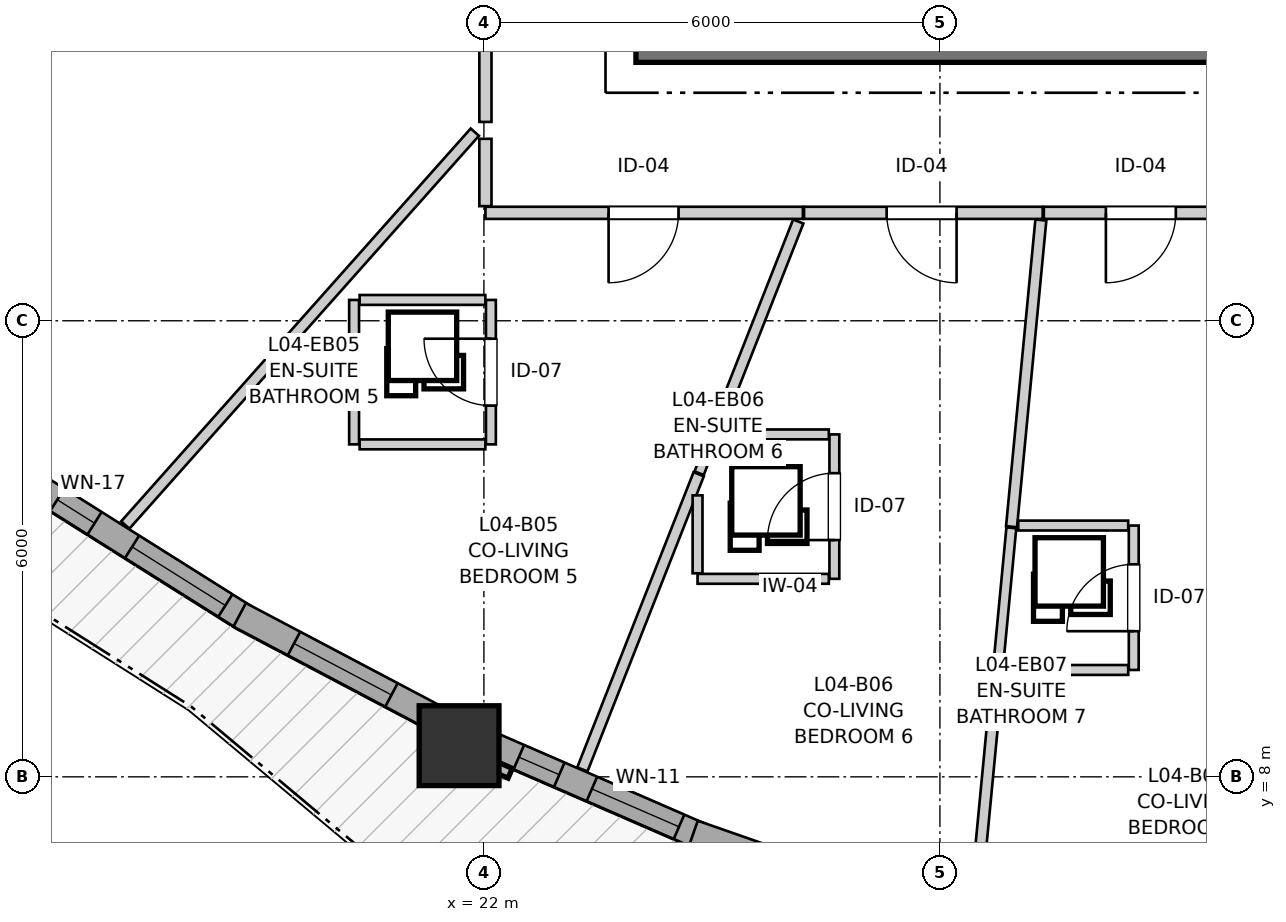
"""IFC4 building model, lengths in metres.
Left out: names, types, materials, properties, quantities, classifications, styles, units other than length and angle.
Written with IfcOpenShell. Run it as: python <this file> out.ifc"""

import sys

from ifc_helpers import new_model, si_unit, direction, frame, frame_2d, origin, origin_2d, place, context, subcontext, project, spatial, rectangle, extrude, source, transform, mapped, element, fill, save


model = new_model("IFC4")
c1 = context("Model", 3, precision=1e-05, world=origin(), true_north=direction((0.0, 1.0)))
c2 = subcontext(c1, "Body", "Model", "MODEL_VIEW")
j1 = project(units=[si_unit("LENGTHUNIT", "METRE"), si_unit("PLANEANGLEUNIT", "RADIAN")], contexts=[c1])
p1 = place(None, origin())
s1 = spatial("IfcSite", under=j1, at=p1, CompositionType="ELEMENT")
p2 = place(p1, origin())
s2 = spatial("IfcBuilding", under=s1, at=p2, CompositionType="ELEMENT")
p3 = place(p2, frame((0.0, 0.0, 17.4)))
s3 = spatial("IfcBuildingStorey", under=s2, at=p3, CompositionType="ELEMENT", Elevation=17.4)
p4 = place(p3, frame((24.0, 17.8, 0.0), z_axis=(0.0, 0.0, 1.0), x_axis=(1.0, 0.0, 0.0)))
e1 = element("IfcWall", 1, at=p4, inside=s3, PredefinedType="SHEAR", context=c2, shape_type="SweptSolid", body=[
    extrude(rectangle(XDim=12.7, YDim=0.8, at=frame_2d((6.35, 0.0))), origin(), (0.0, 0.0, 1.0), 2.94),
])
m1 = source(origin(), c2, "Body", "SweptSolid", [
    extrude(rectangle(XDim=1.05, YDim=1.05, at=origin_2d()), origin(), (0.0, 0.0, 1.0), 2.94),
])
p5 = place(p3, frame((21.673, 8.41, 0.0), z_axis=(0.0, 0.0, 1.0), x_axis=(1.0, 0.0, 0.0)))
e2 = element("IfcColumn", 2, at=p5, inside=s3, PredefinedType="COLUMN", context=c2, shape_type="MappedRepresentation", body=[
    mapped(m1, transform((0.0, 0.0, 0.0), x_axis=(1.0, 0.0, 0.0), y_axis=(0.0, 1.0, 0.0), z_axis=(0.0, 0.0, 1.0), scale=1.0)),
])
p6 = place(p3, frame((16.04, 11.864, 0.0), z_axis=(0.0, 0.0, 1.0), x_axis=(0.846428302834, -0.532502702492, 0.0)))
e3 = element("IfcWall", 3, at=p6, inside=s3, PredefinedType="SOLIDWALL", context=c2, shape_type="SweptSolid", body=[
    extrude(rectangle(XDim=3.336, YDim=0.35, at=frame_2d((1.668, 0.0))), origin(), (0.0, 0.0, 1.0), 2.42),
])
p7 = place(p6, frame((0.409, 0.0, 0.82)))
e4 = element("IfcOpeningElement", 4, at=p7, cuts=e3, PredefinedType="OPENING", context=c2, shape_type="SweptSolid", body=[
    extrude(rectangle(XDim=0.58, YDim=1.35, at=frame_2d((0.29, 0.675))), frame((0.0, 0.185, 0.0), z_axis=(0.0, -1.0, 0.0), x_axis=(1.0, 0.0, 0.0)), (0.0, 0.0, 1.0), 0.37),
])
p8 = place(p6, frame((1.573, 0.0, 0.82)))
e5 = element("IfcOpeningElement", 5, at=p8, cuts=e3, PredefinedType="OPENING", context=c2, shape_type="SweptSolid", body=[
    extrude(rectangle(XDim=1.45, YDim=1.25, at=frame_2d((0.725, 0.625))), frame((0.0, 0.185, 0.0), z_axis=(0.0, -1.0, 0.0), x_axis=(1.0, 0.0, 0.0)), (0.0, 0.0, 1.0), 0.37),
])
p9 = place(p3, frame((18.787, 10.131, 0.0), z_axis=(0.0, 0.0, 1.0), x_axis=(0.88440307047, -0.466723910834, 0.0)))
e6 = element("IfcWall", 6, at=p9, inside=s3, PredefinedType="SOLIDWALL", context=c2, shape_type="SweptSolid", body=[
    extrude(rectangle(XDim=3.056, YDim=0.35, at=frame_2d((1.528, 0.0))), origin(), (0.0, 0.0, 1.0), 2.42),
])
p10 = place(p9, frame((0.808, 0.0, 0.82)))
e7 = element("IfcOpeningElement", 7, at=p10, cuts=e6, PredefinedType="OPENING", context=c2, shape_type="SweptSolid", body=[
    extrude(rectangle(XDim=1.45, YDim=1.25, at=frame_2d((0.725, 0.625))), frame((0.0, 0.185, 0.0), z_axis=(0.0, -1.0, 0.0), x_axis=(1.0, 0.0, 0.0)), (0.0, 0.0, 1.0), 0.37),
])
p11 = place(p3, frame((22.018, 8.451, 0.0), z_axis=(0.0, 0.0, 1.0), x_axis=(0.917071318244, -0.398723208824, 0.0)))
e8 = element("IfcWall", 8, at=p11, inside=s3, PredefinedType="SOLIDWALL", context=c2, shape_type="SweptSolid", body=[
    extrude(rectangle(XDim=3.076, YDim=0.35, at=frame_2d((1.538, 0.0))), origin(), (0.0, 0.0, 1.0), 2.42),
])
p12 = place(p11, frame((0.481, 0.0, 0.82)))
e9 = element("IfcOpeningElement", 9, at=p12, cuts=e8, PredefinedType="OPENING", context=c2, shape_type="SweptSolid", body=[
    extrude(rectangle(XDim=0.58, YDim=1.35, at=frame_2d((0.29, 0.675))), frame((0.0, 0.185, 0.0), z_axis=(0.0, -1.0, 0.0), x_axis=(1.0, 0.0, 0.0)), (0.0, 0.0, 1.0), 0.37),
])
p13 = place(p11, frame((1.529, 0.0, 0.82)))
e10 = element("IfcOpeningElement", 10, at=p13, cuts=e8, PredefinedType="OPENING", context=c2, shape_type="SweptSolid", body=[
    extrude(rectangle(XDim=1.25, YDim=1.35, at=frame_2d((0.625, 0.675))), frame((0.0, 0.185, 0.0), z_axis=(0.0, -1.0, 0.0), x_axis=(1.0, 0.0, 0.0)), (0.0, 0.0, 1.0), 0.37),
])
p14 = place(p3, frame((24.756, 7.257, 0.0), z_axis=(0.0, 0.0, 1.0), x_axis=(0.944142925437, -0.329536244361, 0.0)))
e11 = element("IfcWall", 11, at=p14, inside=s3, PredefinedType="SOLIDWALL", context=c2, shape_type="SweptSolid", body=[
    extrude(rectangle(XDim=3.393, YDim=0.35, at=frame_2d((1.697, 0.0))), origin(), (0.0, 0.0, 1.0), 2.42),
])
p15 = place(p14, frame((0.982, 0.0, 0.82)))
e12 = element("IfcOpeningElement", 12, at=p15, cuts=e11, PredefinedType="OPENING", context=c2, shape_type="SweptSolid", body=[
    extrude(rectangle(XDim=1.45, YDim=1.25, at=frame_2d((0.725, 0.625))), frame((0.0, 0.185, 0.0), z_axis=(0.0, -1.0, 0.0), x_axis=(1.0, 0.0, 0.0)), (0.0, 0.0, 1.0), 0.37),
])
p16 = place(p3, frame((22.02, 16.616, 0.0), z_axis=(0.0, 0.0, 1.0), x_axis=(0.0, 1.0, 0.0)))
e13 = element("IfcWall", 13, at=p16, inside=s3, PredefinedType="PARTITIONING", context=c2, shape_type="SweptSolid", body=[
    extrude(rectangle(XDim=7.534, YDim=0.16, at=frame_2d((3.767, 0.0))), origin(), (0.0, 0.0, 1.0), 2.94),
])
p17 = place(p16, frame((2.98, 0.0, 0.0)))
e14 = element("IfcOpeningElement", 14, at=p17, cuts=e13, PredefinedType="OPENING", context=c2, shape_type="SweptSolid", body=[
    extrude(rectangle(XDim=1.3, YDim=2.1, at=frame_2d((0.65, 1.05))), frame((0.0, 0.09, 0.0), z_axis=(0.0, -1.0, 0.0), x_axis=(1.0, 0.0, 0.0)), (0.0, 0.0, 1.0), 0.18),
])
p18 = place(p3, frame((26.197, 15.42, 0.0), z_axis=(0.0, 0.0, 1.0), x_axis=(-1.0, 0.0, 0.0)))
e15 = element("IfcWall", 15, at=p18, inside=s3, PredefinedType="PARTITIONING", context=c2, shape_type="SweptSolid", body=[
    extrude(rectangle(XDim=4.177, YDim=0.16, at=frame_2d((2.088, 0.0))), origin(), (0.0, 0.0, 1.0), 2.94),
])
p19 = place(p18, frame((1.636, 0.0, 0.0)))
e16 = element("IfcOpeningElement", 16, at=p19, cuts=e15, PredefinedType="OPENING", context=c2, shape_type="SweptSolid", body=[
    extrude(rectangle(XDim=0.92, YDim=2.1, at=frame_2d((0.46, 1.05))), frame((0.0, 0.09, 0.0), z_axis=(0.0, -1.0, 0.0), x_axis=(1.0, 0.0, 0.0)), (0.0, 0.0, 1.0), 0.18),
])
p20 = place(p3, frame((29.352, 15.42, 0.0), z_axis=(0.0, 0.0, 1.0), x_axis=(-1.0, 0.0, 0.0)))
e17 = element("IfcWall", 17, at=p20, inside=s3, PredefinedType="PARTITIONING", context=c2, shape_type="SweptSolid", body=[
    extrude(rectangle(XDim=3.14, YDim=0.16, at=frame_2d((1.57, 0.0))), origin(), (0.0, 0.0, 1.0), 2.94),
])
p21 = place(p20, frame((1.133, 0.0, 0.0)))
e18 = element("IfcOpeningElement", 18, at=p21, cuts=e17, PredefinedType="OPENING", context=c2, shape_type="SweptSolid", body=[
    extrude(rectangle(XDim=0.92, YDim=2.1, at=frame_2d((0.46, 1.05))), frame((0.0, 0.09, 0.0), z_axis=(0.0, -1.0, 0.0), x_axis=(1.0, 0.0, 0.0)), (0.0, 0.0, 1.0), 0.18),
])
p22 = place(p3, frame((31.965, 15.42, 0.0), z_axis=(0.0, 0.0, 1.0), x_axis=(-1.0, 0.0, 0.0)))
e19 = element("IfcWall", 19, at=p22, inside=s3, PredefinedType="PARTITIONING", context=c2, shape_type="SweptSolid", body=[
    extrude(rectangle(XDim=2.598, YDim=0.16, at=frame_2d((1.299, 0.0))), origin(), (0.0, 0.0, 1.0), 2.94),
])
p23 = place(p22, frame((0.862, 0.0, 0.0)))
e20 = element("IfcOpeningElement", 20, at=p23, cuts=e19, PredefinedType="OPENING", context=c2, shape_type="SweptSolid", body=[
    extrude(rectangle(XDim=0.92, YDim=2.1, at=frame_2d((0.46, 1.05))), frame((0.0, 0.09, 0.0), z_axis=(0.0, -1.0, 0.0), x_axis=(1.0, 0.0, 0.0)), (0.0, 0.0, 1.0), 0.18),
])
p24 = place(p3, frame((26.611, 10.605, 0.0), z_axis=(0.0, 0.0, 1.0), x_axis=(0.0, 1.0, 0.0)))
e21 = element("IfcWall", 21, at=p24, inside=s3, PredefinedType="PARTITIONING", context=c2, shape_type="SweptSolid", body=[
    extrude(rectangle(XDim=1.9, YDim=0.13, at=frame_2d((0.95, 0.0))), origin(), (0.0, 0.0, 1.0), 2.94),
])
p25 = place(p24, frame((0.51, 0.0, 0.0)))
e22 = element("IfcOpeningElement", 22, at=p25, cuts=e21, PredefinedType="OPENING", context=c2, shape_type="SweptSolid", body=[
    extrude(rectangle(XDim=0.88, YDim=2.05, at=frame_2d((0.44, 1.025))), frame((0.0, 0.075, 0.0), z_axis=(0.0, -1.0, 0.0), x_axis=(1.0, 0.0, 0.0)), (0.0, 0.0, 1.0), 0.15),
])
p26 = place(p3, frame((22.092, 12.374, 0.0), z_axis=(0.0, 0.0, 1.0), x_axis=(0.0, 1.0, 0.0)))
e23 = element("IfcWall", 23, at=p26, inside=s3, PredefinedType="PARTITIONING", context=c2, shape_type="SweptSolid", body=[
    extrude(rectangle(XDim=1.9, YDim=0.13, at=frame_2d((0.95, 0.0))), origin(), (0.0, 0.0, 1.0), 2.94),
])
p27 = place(p26, frame((0.51, 0.0, 0.0)))
e24 = element("IfcOpeningElement", 24, at=p27, cuts=e23, PredefinedType="OPENING", context=c2, shape_type="SweptSolid", body=[
    extrude(rectangle(XDim=0.88, YDim=2.05, at=frame_2d((0.44, 1.025))), frame((0.0, 0.075, 0.0), z_axis=(0.0, -1.0, 0.0), x_axis=(1.0, 0.0, 0.0)), (0.0, 0.0, 1.0), 0.15),
])
p28 = place(p3, frame((30.55, 9.406, 0.0), z_axis=(0.0, 0.0, 1.0), x_axis=(0.0, 1.0, 0.0)))
e25 = element("IfcWall", 25, at=p28, inside=s3, PredefinedType="PARTITIONING", context=c2, shape_type="SweptSolid", body=[
    extrude(rectangle(XDim=1.9, YDim=0.13, at=frame_2d((0.95, 0.0))), origin(), (0.0, 0.0, 1.0), 2.94),
])
p29 = place(p28, frame((0.51, 0.0, 0.0)))
e26 = element("IfcOpeningElement", 26, at=p29, cuts=e25, PredefinedType="OPENING", context=c2, shape_type="SweptSolid", body=[
    extrude(rectangle(XDim=0.88, YDim=2.05, at=frame_2d((0.44, 1.025))), frame((0.0, 0.075, 0.0), z_axis=(0.0, -1.0, 0.0), x_axis=(1.0, 0.0, 0.0)), (0.0, 0.0, 1.0), 0.15),
])
p30 = place(p3, frame((17.281, 11.313, 0.0), z_axis=(0.0, 0.0, 1.0), x_axis=(0.664782074701, 0.747037343883, 0.0)))
e27 = element("IfcWall", 27, at=p30, inside=s3, PredefinedType="PARTITIONING", context=c2, shape_type="SweptSolid", body=[
    extrude(rectangle(XDim=6.919, YDim=0.145, at=frame_2d((3.459, 0.0))), origin(), (0.0, 0.0, 1.0), 2.94),
])
p31 = place(p3, frame((23.295, 8.098, 0.0), z_axis=(0.0, 0.0, 1.0), x_axis=(0.366696366135, 0.930340676883, 0.0)))
e28 = element("IfcWall", 28, at=p31, inside=s3, PredefinedType="PARTITIONING", context=c2, shape_type="SweptSolid", body=[
    extrude(rectangle(XDim=4.174, YDim=0.145, at=frame_2d((2.087, 0.0))), origin(), (0.0, 0.0, 1.0), 2.94),
])
p32 = place(p3, frame((28.942, 11.291, 0.0), z_axis=(0.0, 0.0, 1.0), x_axis=(0.095244050973, 0.995453952101, 0.0)))
e29 = element("IfcWall", 29, at=p32, inside=s3, PredefinedType="PARTITIONING", context=c2, shape_type="SweptSolid", body=[
    extrude(rectangle(XDim=4.052, YDim=0.145, at=frame_2d((2.026, 0.0))), origin(), (0.0, 0.0, 1.0), 2.94),
])
p33 = place(p3, frame((28.455, 6.206, 0.0), z_axis=(0.0, 0.0, 1.0), x_axis=(0.095101625286, 0.995467568968, 0.0)))
e30 = element("IfcWall", 30, at=p33, inside=s3, PredefinedType="PARTITIONING", context=c2, shape_type="SweptSolid", body=[
    extrude(rectangle(XDim=3.229, YDim=0.145, at=frame_2d((1.615, 0.0))), origin(), (0.0, 0.0, 1.0), 2.94),
])
p34 = place(p3, frame((25.026, 12.49, 0.0), z_axis=(0.0, 0.0, 1.0), x_axis=(0.366755134598, 0.930317510985, 0.0)))
e31 = element("IfcWall", 31, at=p34, inside=s3, PredefinedType="PARTITIONING", context=c2, shape_type="SweptSolid", body=[
    extrude(rectangle(XDim=3.027, YDim=0.145, at=frame_2d((1.513, 0.0))), origin(), (0.0, 0.0, 1.0), 2.94),
])
p35 = place(p3, frame((20.292, 12.374, 0.0), z_axis=(0.0, 0.0, 1.0), x_axis=(0.0, 1.0, 0.0)))
e32 = element("IfcWall", 32, at=p35, inside=s3, PredefinedType="PARTITIONING", context=c2, shape_type="SweptSolid", body=[
    extrude(rectangle(XDim=1.9, YDim=0.13, at=frame_2d((0.95, 0.0))), origin(), (0.0, 0.0, 1.0), 2.94),
])
p36 = place(p3, frame((28.764, 9.436, 0.0), z_axis=(0.0, 0.0, 1.0), x_axis=(0.094821557036, 0.995494285429, 0.0)))
e33 = element("IfcWall", 33, at=p36, inside=s3, PredefinedType="PARTITIONING", context=c2, shape_type="SweptSolid", body=[
    extrude(rectangle(XDim=1.849, YDim=0.13, at=frame_2d((0.924, 0.0))), origin(), (0.0, 0.0, 1.0), 2.94),
])
p37 = place(p3, frame((24.811, 10.605, 0.0), z_axis=(0.0, 0.0, 1.0), x_axis=(1.0, 0.0, 0.0)))
e34 = element("IfcWall", 34, at=p37, inside=s3, PredefinedType="PARTITIONING", context=c2, shape_type="SweptSolid", body=[
    extrude(rectangle(XDim=1.727, YDim=0.13, at=frame_2d((0.864, 0.0))), origin(), (0.0, 0.0, 1.0), 2.508),
])
for number, where, z_axis, x_axis in (
    (35, (20.365, 14.274, 0.0), (0.0, 0.0, 1.0), (1.0, 0.0, 0.0)),
    (36, (20.365, 12.374, 0.0), (0.0, 0.0, 1.0), (1.0, 0.0, 0.0)),
):
    element("IfcWall", number, at=place(p3, frame(where, z_axis=z_axis, x_axis=x_axis)), inside=s3, PredefinedType="PARTITIONING", context=c2, shape_type="SweptSolid", body=[
        extrude(rectangle(XDim=1.654, YDim=0.13, at=frame_2d((0.827, 0.0))), origin(), (0.0, 0.0, 1.0), 2.94),
    ])
p38 = place(p3, frame((28.848, 9.406, 0.0), z_axis=(0.0, 0.0, 1.0), x_axis=(1.0, 0.0, 0.0)))
e37 = element("IfcWall", 37, at=p38, inside=s3, PredefinedType="PARTITIONING", context=c2, shape_type="SweptSolid", body=[
    extrude(rectangle(XDim=1.629, YDim=0.13, at=frame_2d((0.814, 0.0))), origin(), (0.0, 0.0, 1.0), 2.508),
])
p39 = place(p3, frame((29.03, 11.306, 0.0), z_axis=(0.0, 0.0, 1.0), x_axis=(1.0, 0.0, 0.0)))
e38 = element("IfcWall", 38, at=p39, inside=s3, PredefinedType="PARTITIONING", context=c2, shape_type="SweptSolid", body=[
    extrude(rectangle(XDim=1.447, YDim=0.13, at=frame_2d((0.724, 0.0))), origin(), (0.0, 0.0, 1.0), 2.94),
])
p40 = place(p3, frame((25.144, 12.505, 0.0), z_axis=(0.0, 0.0, 1.0), x_axis=(1.0, 0.0, 0.0)))
e39 = element("IfcWall", 39, at=p40, inside=s3, PredefinedType="PARTITIONING", context=c2, shape_type="SweptSolid", body=[
    extrude(rectangle(XDim=1.395, YDim=0.13, at=frame_2d((0.697, 0.0))), origin(), (0.0, 0.0, 1.0), 2.94),
])
p41 = place(p3, frame((24.811, 10.678, 0.0), z_axis=(0.0, 0.0, 1.0), x_axis=(0.0, 1.0, 0.0)))
e40 = element("IfcWall", 40, at=p41, inside=s3, PredefinedType="PARTITIONING", context=c2, shape_type="SweptSolid", body=[
    extrude(rectangle(XDim=1.025, YDim=0.13, at=frame_2d((0.512, 0.0))), origin(), (0.0, 0.0, 1.0), 2.94),
])
p42 = place(p3, frame((22.02, 15.508, 0.0), z_axis=(0.0, 0.0, 1.0), x_axis=(0.0, 1.0, 0.0)))
e41 = element("IfcWall", 41, at=p42, inside=s3, PredefinedType="PARTITIONING", context=c2, shape_type="SweptSolid", body=[
    extrude(rectangle(XDim=0.886, YDim=0.16, at=frame_2d((0.443, 0.0))), origin(), (0.0, 0.0, 1.0), 2.94),
])
p43 = place(p3, frame((24.831, 11.995, 0.0), z_axis=(0.0, 0.0, 1.0), x_axis=(0.366499739739, 0.93041815372, 0.0)))
e42 = element("IfcWall", 42, at=p43, inside=s3, PredefinedType="PARTITIONING", context=c2, shape_type="SweptSolid", body=[
    extrude(rectangle(XDim=0.517, YDim=0.13, at=frame_2d((0.258, 0.0))), origin(), (0.0, 0.0, 1.0), 2.94),
])
m2 = source(origin(), c2, "Body", "SweptSolid", [
    extrude(rectangle(XDim=0.58, YDim=1.35, at=frame_2d((0.29, 0.675))), frame((0.0, 0.03, 0.0), z_axis=(0.0, -1.0, 0.0), x_axis=(1.0, 0.0, 0.0)), (0.0, 0.0, 1.0), 0.06),
])
p44 = place(p7, origin())
e43 = element("IfcWindow", 43, at=p44, inside=s3, PartitioningType="SINGLE_PANEL", PredefinedType="WINDOW", context=c2, shape_type="MappedRepresentation", body=[
    mapped(m2, transform((0.0, 0.0, 0.0), x_axis=(1.0, 0.0, 0.0), y_axis=(0.0, 1.0, 0.0), z_axis=(0.0, 0.0, 1.0), scale=1.0)),
])
fill(e4, e43)
m3 = source(origin(), c2, "Body", "SweptSolid", [
    extrude(rectangle(XDim=1.45, YDim=1.25, at=frame_2d((0.725, 0.625))), frame((0.0, 0.03, 0.0), z_axis=(0.0, -1.0, 0.0), x_axis=(1.0, 0.0, 0.0)), (0.0, 0.0, 1.0), 0.06),
])
p45 = place(p8, origin())
e44 = element("IfcWindow", 44, at=p45, inside=s3, PartitioningType="SINGLE_PANEL", PredefinedType="WINDOW", context=c2, shape_type="MappedRepresentation", body=[
    mapped(m3, transform((0.0, 0.0, 0.0), x_axis=(1.0, 0.0, 0.0), y_axis=(0.0, 1.0, 0.0), z_axis=(0.0, 0.0, 1.0), scale=1.0)),
])
fill(e5, e44)
p46 = place(p10, origin())
e45 = element("IfcWindow", 45, at=p46, inside=s3, PartitioningType="SINGLE_PANEL", PredefinedType="WINDOW", context=c2, shape_type="MappedRepresentation", body=[
    mapped(m3, transform((0.0, 0.0, 0.0), x_axis=(1.0, 0.0, 0.0), y_axis=(0.0, 1.0, 0.0), z_axis=(0.0, 0.0, 1.0), scale=1.0)),
])
fill(e7, e45)
p47 = place(p12, origin())
e46 = element("IfcWindow", 46, at=p47, inside=s3, PartitioningType="SINGLE_PANEL", PredefinedType="WINDOW", context=c2, shape_type="MappedRepresentation", body=[
    mapped(m2, transform((0.0, 0.0, 0.0), x_axis=(1.0, 0.0, 0.0), y_axis=(0.0, 1.0, 0.0), z_axis=(0.0, 0.0, 1.0), scale=1.0)),
])
fill(e9, e46)
m4 = source(origin(), c2, "Body", "SweptSolid", [
    extrude(rectangle(XDim=1.25, YDim=1.35, at=frame_2d((0.625, 0.675))), frame((0.0, 0.03, 0.0), z_axis=(0.0, -1.0, 0.0), x_axis=(1.0, 0.0, 0.0)), (0.0, 0.0, 1.0), 0.06),
])
p48 = place(p13, origin())
e47 = element("IfcWindow", 47, at=p48, inside=s3, PartitioningType="SINGLE_PANEL", PredefinedType="WINDOW", context=c2, shape_type="MappedRepresentation", body=[
    mapped(m4, transform((0.0, 0.0, 0.0), x_axis=(1.0, 0.0, 0.0), y_axis=(0.0, 1.0, 0.0), z_axis=(0.0, 0.0, 1.0), scale=1.0)),
])
fill(e10, e47)
m5 = source(origin(), c2, "Body", "SweptSolid", [
    extrude(rectangle(XDim=0.92, YDim=2.1, at=frame_2d((0.46, 1.05))), frame((0.0, 0.025, 0.0), z_axis=(0.0, -1.0, 0.0), x_axis=(1.0, 0.0, 0.0)), (0.0, 0.0, 1.0), 0.05),
])
p49 = place(p19, origin())
e48 = element("IfcDoor", 48, at=p49, inside=s3, OperationType="SINGLE_SWING_RIGHT", PredefinedType="DOOR", context=c2, shape_type="MappedRepresentation", body=[
    mapped(m5, transform((0.0, 0.0, 0.0), x_axis=(1.0, 0.0, 0.0), y_axis=(0.0, 1.0, 0.0), z_axis=(0.0, 0.0, 1.0), scale=1.0)),
])
fill(e16, e48)
p50 = place(p21, origin())
e49 = element("IfcDoor", 49, at=p50, inside=s3, OperationType="SINGLE_SWING_LEFT", PredefinedType="DOOR", context=c2, shape_type="MappedRepresentation", body=[
    mapped(m5, transform((0.0, 0.0, 0.0), x_axis=(1.0, 0.0, 0.0), y_axis=(0.0, 1.0, 0.0), z_axis=(0.0, 0.0, 1.0), scale=1.0)),
])
fill(e18, e49)
p51 = place(p23, origin())
e50 = element("IfcDoor", 50, at=p51, inside=s3, OperationType="SINGLE_SWING_RIGHT", PredefinedType="DOOR", context=c2, shape_type="MappedRepresentation", body=[
    mapped(m5, transform((0.0, 0.0, 0.0), x_axis=(1.0, 0.0, 0.0), y_axis=(0.0, 1.0, 0.0), z_axis=(0.0, 0.0, 1.0), scale=1.0)),
])
fill(e20, e50)
m6 = source(origin(), c2, "Body", "SweptSolid", [
    extrude(rectangle(XDim=0.88, YDim=2.05, at=frame_2d((0.44, 1.025))), frame((0.0, 0.025, 0.0), z_axis=(0.0, -1.0, 0.0), x_axis=(1.0, 0.0, 0.0)), (0.0, 0.0, 1.0), 0.05),
])
p52 = place(p25, origin())
e51 = element("IfcDoor", 51, at=p52, inside=s3, OperationType="SINGLE_SWING_LEFT", PredefinedType="DOOR", context=c2, shape_type="MappedRepresentation", body=[
    mapped(m6, transform((0.0, 0.0, 0.0), x_axis=(1.0, 0.0, 0.0), y_axis=(0.0, 1.0, 0.0), z_axis=(0.0, 0.0, 1.0), scale=1.0)),
])
fill(e22, e51)
p53 = place(p27, origin())
e52 = element("IfcDoor", 52, at=p53, inside=s3, OperationType="SINGLE_SWING_RIGHT", PredefinedType="DOOR", context=c2, shape_type="MappedRepresentation", body=[
    mapped(m6, transform((0.0, 0.0, 0.0), x_axis=(1.0, 0.0, 0.0), y_axis=(0.0, 1.0, 0.0), z_axis=(0.0, 0.0, 1.0), scale=1.0)),
])
fill(e24, e52)
p54 = place(p29, origin())
e53 = element("IfcDoor", 53, at=p54, inside=s3, OperationType="SINGLE_SWING_LEFT", PredefinedType="DOOR", context=c2, shape_type="MappedRepresentation", body=[
    mapped(m6, transform((0.0, 0.0, 0.0), x_axis=(1.0, 0.0, 0.0), y_axis=(0.0, 1.0, 0.0), z_axis=(0.0, 0.0, 1.0), scale=1.0)),
])
fill(e26, e53)
save(model, sys.argv[1])
